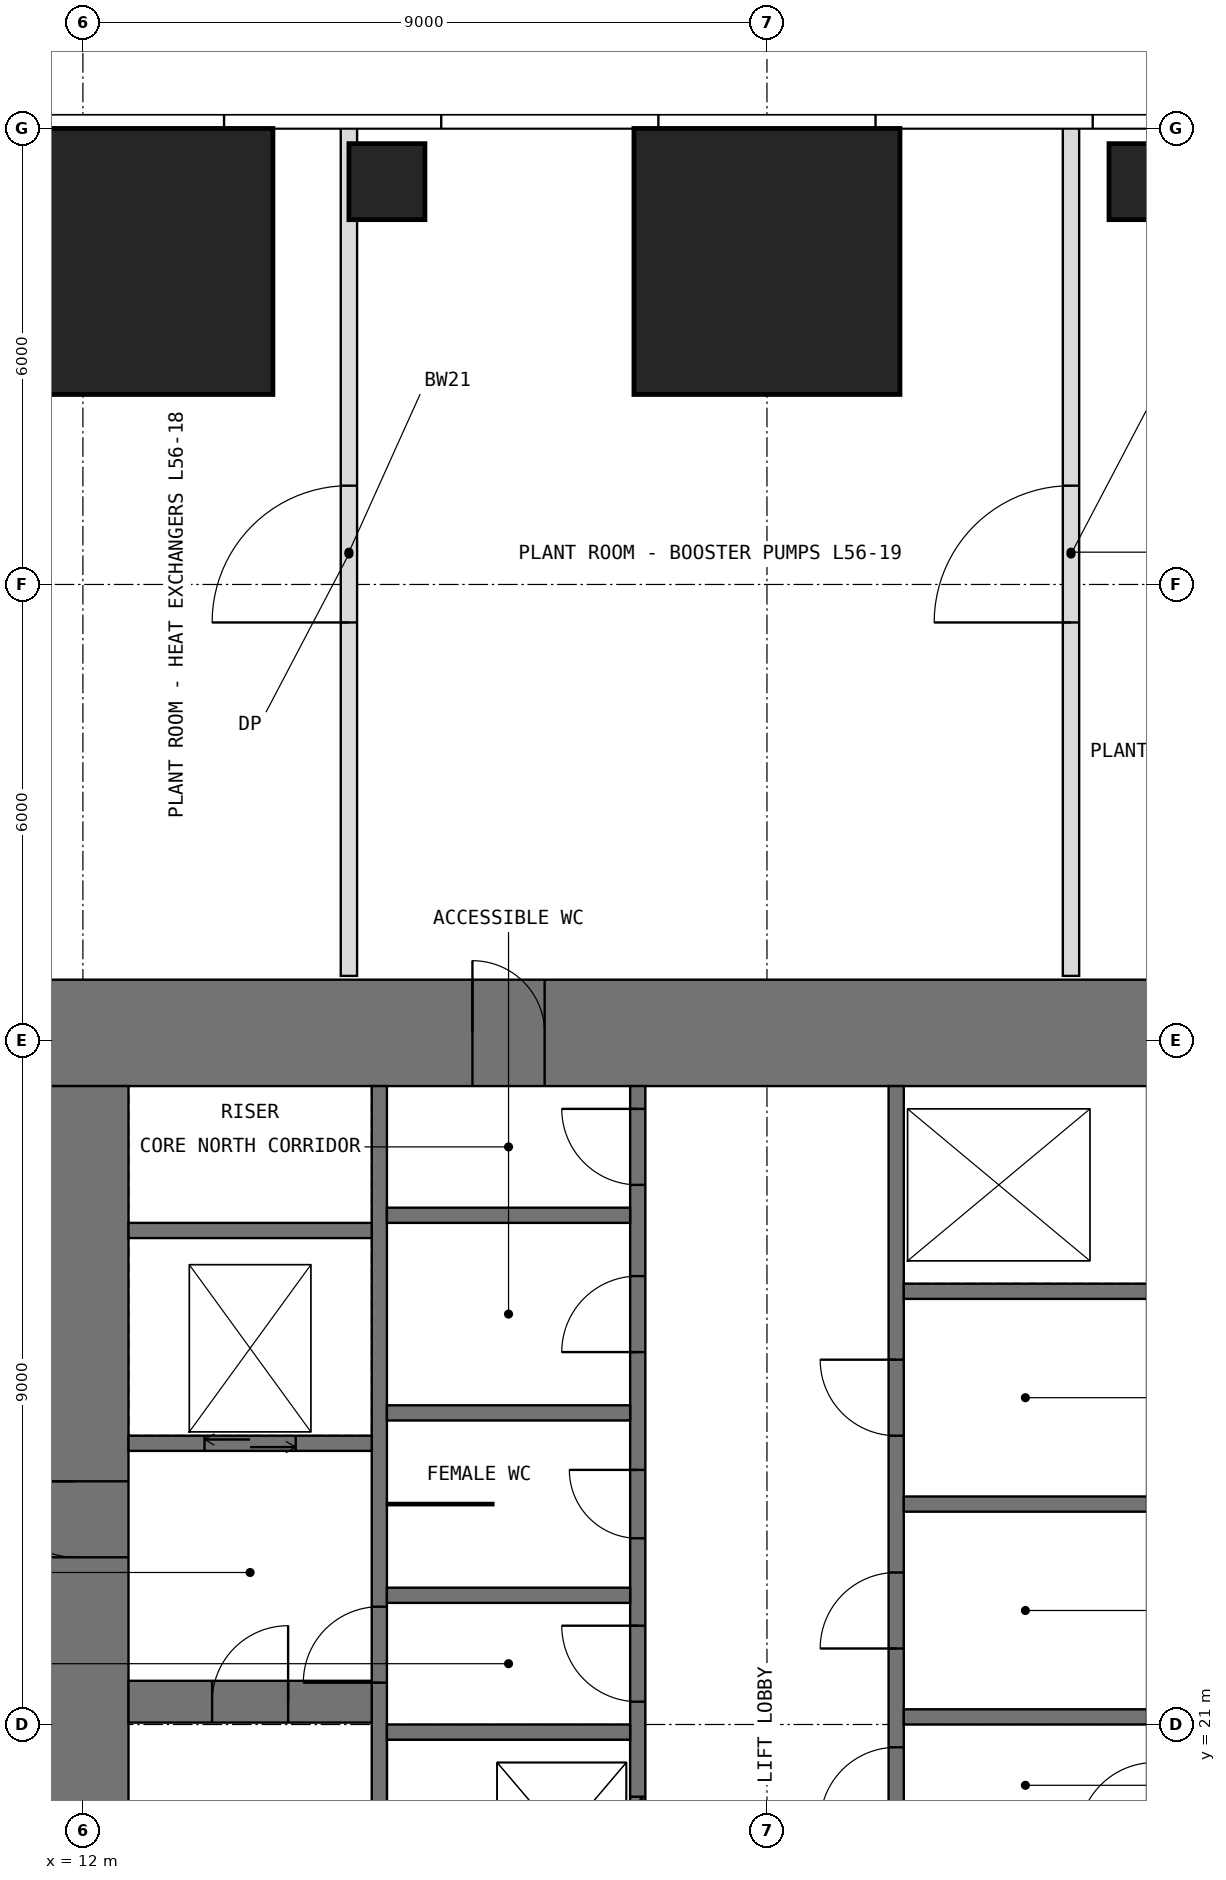
"""IFC4 building model, lengths in metres.
Left out: names, types, materials, properties, quantities, classifications, styles, units other than length and angle.
Written with IfcOpenShell. Run it as: python <this file> out.ifc"""

import sys

from ifc_helpers import new_model, si_unit, direction, frame, frame_2d, origin, origin_2d, place, context, subcontext, project, spatial, rectangle, extrude, element, fill, save


model = new_model("IFC4")
c1 = context("Model", 3, precision=1e-05, world=origin(), true_north=direction((0.0, 1.0)))
c2 = subcontext(c1, "Body", "Model", "MODEL_VIEW")
j1 = project(units=[si_unit("LENGTHUNIT", "METRE"), si_unit("PLANEANGLEUNIT", "RADIAN")], contexts=[c1])
p1 = place(None, origin())
s1 = spatial("IfcSite", under=j1, at=p1, CompositionType="ELEMENT")
p2 = place(p1, origin())
s2 = spatial("IfcBuilding", under=s1, at=p2, CompositionType="ELEMENT")
p3 = place(p2, frame((0.0, 0.0, 234.5)))
s3 = spatial("IfcBuildingStorey", under=s2, at=p3, CompositionType="ELEMENT", Elevation=234.5)
p4 = place(p3, frame((12.75, 40.25, 0.0), z_axis=(0.0, 0.0, 1.0), x_axis=(1.0, 0.0, 0.0)))
e1 = element("IfcColumn", 1, at=p4, inside=s3, PredefinedType="COLUMN", context=c2, shape_type="SweptSolid", body=[
    extrude(rectangle(XDim=3.5, YDim=3.5, at=origin_2d()), origin(), (0.0, 0.0, 1.0), 5.0),
])
p5 = place(p3, frame((16.0, 41.3, 0.0), z_axis=(0.0, 0.0, 1.0), x_axis=(1.0, 0.0, 0.0)))
e2 = element("IfcColumn", 2, at=p5, inside=s3, PredefinedType="COLUMN", context=c2, shape_type="SweptSolid", body=[
    extrude(rectangle(XDim=1.0, YDim=1.0, at=origin_2d()), origin(), (0.0, 0.0, 1.0), 5.0),
])
p6 = place(p3, frame((21.0, 40.25, 0.0), z_axis=(0.0, 0.0, 1.0), x_axis=(1.0, 0.0, 0.0)))
e3 = element("IfcColumn", 3, at=p6, inside=s3, PredefinedType="COLUMN", context=c2, shape_type="SweptSolid", body=[
    extrude(rectangle(XDim=3.5, YDim=3.5, at=origin_2d()), origin(), (0.0, 0.0, 1.0), 5.0),
])
p7 = place(p3, frame((26.0, 41.3, 0.0), z_axis=(0.0, 0.0, 1.0), x_axis=(1.0, 0.0, 0.0)))
e4 = element("IfcColumn", 4, at=p7, inside=s3, PredefinedType="COLUMN", context=c2, shape_type="SweptSolid", body=[
    extrude(rectangle(XDim=1.0, YDim=1.0, at=origin_2d()), origin(), (0.0, 0.0, 1.0), 5.0),
])
p8 = place(p3, frame((11.2, 30.1, -0.25), z_axis=(0.0, 0.0, 1.0), x_axis=(1.0, 0.0, 0.0)))
e5 = element("IfcWall", 5, at=p8, inside=s3, PredefinedType="SHEAR", context=c2, shape_type="SweptSolid", body=[
    extrude(rectangle(XDim=19.6, YDim=1.4, at=frame_2d((9.8, 0.0))), origin(), (0.0, 0.0, 1.0), 5.2),
])
p9 = place(p8, frame((5.925, 0.0, 0.25)))
e6 = element("IfcOpeningElement", 6, at=p9, cuts=e5, PredefinedType="OPENING", context=c2, shape_type="SweptSolid", body=[
    extrude(rectangle(XDim=0.95, YDim=2.4, at=frame_2d((0.475, 1.2))), frame((0.0, 0.71, 0.0), z_axis=(0.0, -1.0, 0.0), x_axis=(1.0, 0.0, 0.0)), (0.0, 0.0, 1.0), 1.42),
])
p10 = place(p3, frame((11.9, 12.6, -0.25), z_axis=(0.0, 0.0, 1.0), x_axis=(0.0, 1.0, 0.0)))
e7 = element("IfcWall", 7, at=p10, inside=s3, PredefinedType="SHEAR", context=c2, shape_type="SweptSolid", body=[
    extrude(rectangle(XDim=16.8, YDim=1.4, at=frame_2d((8.4, 0.0))), origin(), (0.0, 0.0, 1.0), 5.2),
])
p11 = place(p10, frame((10.6, 0.0, 0.25)))
e8 = element("IfcOpeningElement", 8, at=p11, cuts=e7, PredefinedType="OPENING", context=c2, shape_type="SweptSolid", body=[
    extrude(rectangle(XDim=1.0, YDim=2.2, at=frame_2d((0.5, 1.1))), frame((0.0, 0.71, 0.0), z_axis=(0.0, -1.0, 0.0), x_axis=(1.0, 0.0, 0.0)), (0.0, 0.0, 1.0), 1.42),
])
p12 = place(p3, frame((15.9, 12.6, -0.25), z_axis=(0.0, 0.0, 1.0), x_axis=(0.0, 1.0, 0.0)))
e9 = element("IfcWall", 9, at=p12, inside=s3, PredefinedType="SHEAR", context=c2, shape_type="SweptSolid", body=[
    extrude(rectangle(XDim=16.8, YDim=0.2, at=frame_2d((8.4, 0.0))), origin(), (0.0, 0.0, 1.0), 5.2),
])
p13 = place(p12, frame((8.95, 0.0, 0.25)))
e10 = element("IfcOpeningElement", 10, at=p13, cuts=e9, PredefinedType="OPENING", context=c2, shape_type="SweptSolid", body=[
    extrude(rectangle(XDim=1.0, YDim=2.2, at=frame_2d((0.5, 1.1))), frame((0.0, 0.11, 0.0), z_axis=(0.0, -1.0, 0.0), x_axis=(1.0, 0.0, 0.0)), (0.0, 0.0, 1.0), 0.22),
])
p14 = place(p3, frame((19.3, 12.6, -0.25), z_axis=(0.0, 0.0, 1.0), x_axis=(0.0, 1.0, 0.0)))
e11 = element("IfcWall", 11, at=p14, inside=s3, PredefinedType="SHEAR", context=c2, shape_type="SweptSolid", body=[
    extrude(rectangle(XDim=16.8, YDim=0.2, at=frame_2d((8.4, 0.0))), origin(), (0.0, 0.0, 1.0), 5.2),
])
p15 = place(p14, frame((8.7, 0.0, 0.25)))
e12 = element("IfcOpeningElement", 12, at=p15, cuts=e11, PredefinedType="OPENING", context=c2, shape_type="SweptSolid", body=[
    extrude(rectangle(XDim=1.0, YDim=2.2, at=frame_2d((0.5, 1.1))), frame((0.0, 0.11, 0.0), z_axis=(0.0, -1.0, 0.0), x_axis=(1.0, 0.0, 0.0)), (0.0, 0.0, 1.0), 0.22),
])
p16 = place(p14, frame((10.85, 0.0, 0.25)))
e13 = element("IfcOpeningElement", 13, at=p16, cuts=e11, PredefinedType="OPENING", context=c2, shape_type="SweptSolid", body=[
    extrude(rectangle(XDim=0.9, YDim=2.2, at=frame_2d((0.45, 1.1))), frame((0.0, 0.11, 0.0), z_axis=(0.0, -1.0, 0.0), x_axis=(1.0, 0.0, 0.0)), (0.0, 0.0, 1.0), 0.22),
])
p17 = place(p14, frame((13.3, 0.0, 0.25)))
e14 = element("IfcOpeningElement", 14, at=p17, cuts=e11, PredefinedType="OPENING", context=c2, shape_type="SweptSolid", body=[
    extrude(rectangle(XDim=1.0, YDim=2.2, at=frame_2d((0.5, 1.1))), frame((0.0, 0.11, 0.0), z_axis=(0.0, -1.0, 0.0), x_axis=(1.0, 0.0, 0.0)), (0.0, 0.0, 1.0), 0.22),
])
p18 = place(p14, frame((15.5, 0.0, 0.25)))
e15 = element("IfcOpeningElement", 15, at=p18, cuts=e11, PredefinedType="OPENING", context=c2, shape_type="SweptSolid", body=[
    extrude(rectangle(XDim=1.0, YDim=2.2, at=frame_2d((0.5, 1.1))), frame((0.0, 0.11, 0.0), z_axis=(0.0, -1.0, 0.0), x_axis=(1.0, 0.0, 0.0)), (0.0, 0.0, 1.0), 0.22),
])
p19 = place(p14, frame((0.75, 0.0, 0.25)))
e16 = element("IfcOpeningElement", 16, at=p19, cuts=e11, PredefinedType="OPENING", context=c2, shape_type="SweptSolid", body=[
    extrude(rectangle(XDim=1.1, YDim=2.2, at=frame_2d((0.55, 1.1))), frame((0.0, 0.11, 0.0), z_axis=(0.0, -1.0, 0.0), x_axis=(1.0, 0.0, 0.0)), (0.0, 0.0, 1.0), 0.22),
])
p20 = place(p14, frame((3.55, 0.0, 0.25)))
e17 = element("IfcOpeningElement", 17, at=p20, cuts=e11, PredefinedType="OPENING", context=c2, shape_type="SweptSolid", body=[
    extrude(rectangle(XDim=1.1, YDim=2.2, at=frame_2d((0.55, 1.1))), frame((0.0, 0.11, 0.0), z_axis=(0.0, -1.0, 0.0), x_axis=(1.0, 0.0, 0.0)), (0.0, 0.0, 1.0), 0.22),
])
p21 = place(p14, frame((6.35, 0.0, 0.25)))
e18 = element("IfcOpeningElement", 18, at=p21, cuts=e11, PredefinedType="OPENING", context=c2, shape_type="SweptSolid", body=[
    extrude(rectangle(XDim=1.1, YDim=2.2, at=frame_2d((0.55, 1.1))), frame((0.0, 0.11, 0.0), z_axis=(0.0, -1.0, 0.0), x_axis=(1.0, 0.0, 0.0)), (0.0, 0.0, 1.0), 0.22),
])
p22 = place(p3, frame((22.7, 12.6, -0.25), z_axis=(0.0, 0.0, 1.0), x_axis=(0.0, 1.0, 0.0)))
e19 = element("IfcWall", 19, at=p22, inside=s3, PredefinedType="SHEAR", context=c2, shape_type="SweptSolid", body=[
    extrude(rectangle(XDim=16.8, YDim=0.2, at=frame_2d((8.4, 0.0))), origin(), (0.0, 0.0, 1.0), 5.2),
])
p23 = place(p22, frame((0.4, 0.0, 0.25)))
e20 = element("IfcOpeningElement", 20, at=p23, cuts=e19, PredefinedType="OPENING", context=c2, shape_type="SweptSolid", body=[
    extrude(rectangle(XDim=1.0, YDim=2.2, at=frame_2d((0.5, 1.1))), frame((0.0, 0.11, 0.0), z_axis=(0.0, -1.0, 0.0), x_axis=(1.0, 0.0, 0.0)), (0.0, 0.0, 1.0), 0.22),
])
p24 = place(p22, frame((7.1, 0.0, 0.25)))
e21 = element("IfcOpeningElement", 21, at=p24, cuts=e19, PredefinedType="OPENING", context=c2, shape_type="SweptSolid", body=[
    extrude(rectangle(XDim=1.0, YDim=2.2, at=frame_2d((0.5, 1.1))), frame((0.0, 0.11, 0.0), z_axis=(0.0, -1.0, 0.0), x_axis=(1.0, 0.0, 0.0)), (0.0, 0.0, 1.0), 0.22),
])
p25 = place(p22, frame((2.45, 0.0, 0.25)))
e22 = element("IfcOpeningElement", 22, at=p25, cuts=e19, PredefinedType="OPENING", context=c2, shape_type="SweptSolid", body=[
    extrude(rectangle(XDim=0.9, YDim=2.2, at=frame_2d((0.45, 1.1))), frame((0.0, 0.11, 0.0), z_axis=(0.0, -1.0, 0.0), x_axis=(1.0, 0.0, 0.0)), (0.0, 0.0, 1.0), 0.22),
])
p26 = place(p22, frame((4.95, 0.0, 0.25)))
e23 = element("IfcOpeningElement", 23, at=p26, cuts=e19, PredefinedType="OPENING", context=c2, shape_type="SweptSolid", body=[
    extrude(rectangle(XDim=0.9, YDim=2.2, at=frame_2d((0.45, 1.1))), frame((0.0, 0.11, 0.0), z_axis=(0.0, -1.0, 0.0), x_axis=(1.0, 0.0, 0.0)), (0.0, 0.0, 1.0), 0.22),
])
p27 = place(p22, frame((9.4, 0.0, 0.25)))
e24 = element("IfcOpeningElement", 24, at=p27, cuts=e19, PredefinedType="OPENING", context=c2, shape_type="SweptSolid", body=[
    extrude(rectangle(XDim=1.0, YDim=2.2, at=frame_2d((0.5, 1.1))), frame((0.0, 0.11, 0.0), z_axis=(0.0, -1.0, 0.0), x_axis=(1.0, 0.0, 0.0)), (0.0, 0.0, 1.0), 0.22),
])
p28 = place(p22, frame((12.2, 0.0, 0.25)))
e25 = element("IfcOpeningElement", 25, at=p28, cuts=e19, PredefinedType="OPENING", context=c2, shape_type="SweptSolid", body=[
    extrude(rectangle(XDim=1.0, YDim=2.2, at=frame_2d((0.5, 1.1))), frame((0.0, 0.11, 0.0), z_axis=(0.0, -1.0, 0.0), x_axis=(1.0, 0.0, 0.0)), (0.0, 0.0, 1.0), 0.22),
])
p29 = place(p3, frame((12.6, 21.3, -0.25), z_axis=(0.0, 0.0, 1.0), x_axis=(1.0, 0.0, 0.0)))
e26 = element("IfcWall", 26, at=p29, inside=s3, PredefinedType="SHEAR", context=c2, shape_type="SweptSolid", body=[
    extrude(rectangle(XDim=3.2, YDim=0.55, at=frame_2d((1.6, 0.0))), origin(), (0.0, 0.0, 1.0), 5.2),
])
p30 = place(p29, frame((1.1, 0.0, 0.25)))
e27 = element("IfcOpeningElement", 27, at=p30, cuts=e26, PredefinedType="OPENING", context=c2, shape_type="SweptSolid", body=[
    extrude(rectangle(XDim=1.0, YDim=2.2, at=frame_2d((0.5, 1.1))), frame((0.0, 0.285, 0.0), z_axis=(0.0, -1.0, 0.0), x_axis=(1.0, 0.0, 0.0)), (0.0, 0.0, 1.0), 0.57),
])
p31 = place(p3, frame((12.6, 24.7, -0.25), z_axis=(0.0, 0.0, 1.0), x_axis=(1.0, 0.0, 0.0)))
e28 = element("IfcWall", 28, at=p31, inside=s3, PredefinedType="SHEAR", context=c2, shape_type="SweptSolid", body=[
    extrude(rectangle(XDim=3.2, YDim=0.2, at=frame_2d((1.6, 0.0))), origin(), (0.0, 0.0, 1.0), 5.2),
])
p32 = place(p31, frame((1.0, 0.0, 0.25)))
e29 = element("IfcOpeningElement", 29, at=p32, cuts=e28, PredefinedType="OPENING", context=c2, shape_type="SweptSolid", body=[
    extrude(rectangle(XDim=1.2, YDim=2.2, at=frame_2d((0.6, 1.1))), frame((0.0, 0.11, 0.0), z_axis=(0.0, -1.0, 0.0), x_axis=(1.0, 0.0, 0.0)), (0.0, 0.0, 1.0), 0.22),
])
for number, where, z_axis, x_axis in (
    (30, (12.6, 27.5, -0.25), (0.0, 0.0, 1.0), (1.0, 0.0, 0.0)),
    (31, (16.0, 20.9, -0.25), (0.0, 0.0, 1.0), (1.0, 0.0, 0.0)),
    (32, (16.0, 22.7, -0.25), (0.0, 0.0, 1.0), (1.0, 0.0, 0.0)),
    (33, (16.0, 25.1, -0.25), (0.0, 0.0, 1.0), (1.0, 0.0, 0.0)),
    (34, (16.0, 27.7, -0.25), (0.0, 0.0, 1.0), (1.0, 0.0, 0.0)),
    (35, (22.8, 21.1, -0.25), (0.0, 0.0, 1.0), (1.0, 0.0, 0.0)),
    (36, (22.8, 23.9, -0.25), (0.0, 0.0, 1.0), (1.0, 0.0, 0.0)),
    (37, (22.8, 26.7, -0.25), (0.0, 0.0, 1.0), (1.0, 0.0, 0.0)),
):
    element("IfcWall", number, at=place(p3, frame(where, z_axis=z_axis, x_axis=x_axis)), inside=s3, PredefinedType="SHEAR", context=c2, shape_type="SweptSolid", body=[
        extrude(rectangle(XDim=3.2, YDim=0.2, at=frame_2d((1.6, 0.0))), origin(), (0.0, 0.0, 1.0), 5.2),
    ])
p33 = place(p3, frame((16.0, 23.9, 0.0), z_axis=(0.0, 0.0, 1.0), x_axis=(1.0, 0.0, 0.0)))
e38 = element("IfcWall", 38, at=p33, inside=s3, PredefinedType="PARTITIONING", context=c2, shape_type="SweptSolid", body=[
    extrude(rectangle(XDim=1.4, YDim=0.03, at=frame_2d((0.7, 0.0))), origin(), (0.0, 0.0, 1.0), 4.75),
])
p34 = place(p3, frame((15.5, 30.85, 0.0), z_axis=(0.0, 0.0, 1.0), x_axis=(0.0, 1.0, 0.0)))
e39 = element("IfcWall", 39, at=p34, inside=s3, PredefinedType="PARTITIONING", context=c2, shape_type="SweptSolid", body=[
    extrude(rectangle(XDim=11.15, YDim=0.215, at=frame_2d((5.575, 0.0))), origin(), (0.0, 0.0, 1.0), 4.75),
])
p35 = place(p34, frame((4.65, 0.0, 0.0)))
e40 = element("IfcOpeningElement", 40, at=p35, cuts=e39, PredefinedType="OPENING", context=c2, shape_type="SweptSolid", body=[
    extrude(rectangle(XDim=1.8, YDim=2.4, at=frame_2d((0.9, 1.2))), frame((0.0, 0.118, 0.0), z_axis=(0.0, -1.0, 0.0), x_axis=(1.0, 0.0, 0.0)), (0.0, 0.0, 1.0), 0.235),
])
p36 = place(p3, frame((25.0, 30.85, 0.0), z_axis=(0.0, 0.0, 1.0), x_axis=(0.0, 1.0, 0.0)))
e41 = element("IfcWall", 41, at=p36, inside=s3, PredefinedType="PARTITIONING", context=c2, shape_type="SweptSolid", body=[
    extrude(rectangle(XDim=11.15, YDim=0.215, at=frame_2d((5.575, 0.0))), origin(), (0.0, 0.0, 1.0), 4.75),
])
p37 = place(p36, frame((4.65, 0.0, 0.0)))
e42 = element("IfcOpeningElement", 42, at=p37, cuts=e41, PredefinedType="OPENING", context=c2, shape_type="SweptSolid", body=[
    extrude(rectangle(XDim=1.8, YDim=2.4, at=frame_2d((0.9, 1.2))), frame((0.0, 0.118, 0.0), z_axis=(0.0, -1.0, 0.0), x_axis=(1.0, 0.0, 0.0)), (0.0, 0.0, 1.0), 0.235),
])
p38 = place(p9, origin())
e43 = element("IfcDoor", 43, at=p38, inside=s3, OperationType="SINGLE_SWING_LEFT", PredefinedType="DOOR", context=c2, shape_type="SweptSolid", body=[
    extrude(rectangle(XDim=0.95, YDim=2.4, at=frame_2d((0.475, 1.2))), frame((0.0, 0.225, 0.0), z_axis=(0.0, -1.0, 0.0), x_axis=(1.0, 0.0, 0.0)), (0.0, 0.0, 1.0), 0.05),
])
fill(e6, e43)
p39 = place(p11, origin())
e44 = element("IfcDoor", 44, at=p39, inside=s3, OperationType="SINGLE_SWING_RIGHT", PredefinedType="DOOR", context=c2, shape_type="SweptSolid", body=[
    extrude(rectangle(XDim=1.0, YDim=2.2, at=frame_2d((0.5, 1.1))), frame((0.0, 0.025, 0.0), z_axis=(0.0, -1.0, 0.0), x_axis=(1.0, 0.0, 0.0)), (0.0, 0.0, 1.0), 0.05),
])
fill(e8, e44)
p40 = place(p30, origin())
e45 = element("IfcDoor", 45, at=p40, inside=s3, OperationType="SINGLE_SWING_RIGHT", PredefinedType="DOOR", context=c2, shape_type="SweptSolid", body=[
    extrude(rectangle(XDim=1.0, YDim=2.2, at=frame_2d((0.5, 1.1))), frame((0.0, 0.025, 0.0), z_axis=(0.0, -1.0, 0.0), x_axis=(1.0, 0.0, 0.0)), (0.0, 0.0, 1.0), 0.05),
])
fill(e27, e45)
p41 = place(p13, origin())
e46 = element("IfcDoor", 46, at=p41, inside=s3, OperationType="SINGLE_SWING_LEFT", PredefinedType="DOOR", context=c2, shape_type="SweptSolid", body=[
    extrude(rectangle(XDim=1.0, YDim=2.2, at=frame_2d((0.5, 1.1))), frame((0.0, 0.025, 0.0), z_axis=(0.0, -1.0, 0.0), x_axis=(1.0, 0.0, 0.0)), (0.0, 0.0, 1.0), 0.05),
])
fill(e10, e46)
p42 = place(p15, origin())
e47 = element("IfcDoor", 47, at=p42, inside=s3, OperationType="SINGLE_SWING_RIGHT", PredefinedType="DOOR", context=c2, shape_type="SweptSolid", body=[
    extrude(rectangle(XDim=1.0, YDim=2.2, at=frame_2d((0.5, 1.1))), frame((0.0, 0.025, 0.0), z_axis=(0.0, -1.0, 0.0), x_axis=(1.0, 0.0, 0.0)), (0.0, 0.0, 1.0), 0.05),
])
fill(e12, e47)
p43 = place(p24, origin())
e48 = element("IfcDoor", 48, at=p43, inside=s3, OperationType="SINGLE_SWING_LEFT", PredefinedType="DOOR", context=c2, shape_type="SweptSolid", body=[
    extrude(rectangle(XDim=1.0, YDim=2.2, at=frame_2d((0.5, 1.1))), frame((0.0, 0.025, 0.0), z_axis=(0.0, -1.0, 0.0), x_axis=(1.0, 0.0, 0.0)), (0.0, 0.0, 1.0), 0.05),
])
fill(e21, e48)
p44 = place(p16, origin())
e49 = element("IfcDoor", 49, at=p44, inside=s3, OperationType="SINGLE_SWING_RIGHT", PredefinedType="DOOR", context=c2, shape_type="SweptSolid", body=[
    extrude(rectangle(XDim=0.9, YDim=2.2, at=frame_2d((0.45, 1.1))), frame((0.0, 0.025, 0.0), z_axis=(0.0, -1.0, 0.0), x_axis=(1.0, 0.0, 0.0)), (0.0, 0.0, 1.0), 0.05),
])
fill(e13, e49)
p45 = place(p17, origin())
e50 = element("IfcDoor", 50, at=p45, inside=s3, OperationType="SINGLE_SWING_LEFT", PredefinedType="DOOR", context=c2, shape_type="SweptSolid", body=[
    extrude(rectangle(XDim=1.0, YDim=2.2, at=frame_2d((0.5, 1.1))), frame((0.0, 0.025, 0.0), z_axis=(0.0, -1.0, 0.0), x_axis=(1.0, 0.0, 0.0)), (0.0, 0.0, 1.0), 0.05),
])
fill(e14, e50)
p46 = place(p18, origin())
e51 = element("IfcDoor", 51, at=p46, inside=s3, OperationType="SINGLE_SWING_RIGHT", PredefinedType="DOOR", context=c2, shape_type="SweptSolid", body=[
    extrude(rectangle(XDim=1.0, YDim=2.2, at=frame_2d((0.5, 1.1))), frame((0.0, 0.025, 0.0), z_axis=(0.0, -1.0, 0.0), x_axis=(1.0, 0.0, 0.0)), (0.0, 0.0, 1.0), 0.05),
])
fill(e15, e51)
p47 = place(p27, origin())
e52 = element("IfcDoor", 52, at=p47, inside=s3, OperationType="SINGLE_SWING_LEFT", PredefinedType="DOOR", context=c2, shape_type="SweptSolid", body=[
    extrude(rectangle(XDim=1.0, YDim=2.2, at=frame_2d((0.5, 1.1))), frame((0.0, 0.025, 0.0), z_axis=(0.0, -1.0, 0.0), x_axis=(1.0, 0.0, 0.0)), (0.0, 0.0, 1.0), 0.05),
])
fill(e24, e52)
p48 = place(p28, origin())
e53 = element("IfcDoor", 53, at=p48, inside=s3, OperationType="SINGLE_SWING_RIGHT", PredefinedType="DOOR", context=c2, shape_type="SweptSolid", body=[
    extrude(rectangle(XDim=1.0, YDim=2.2, at=frame_2d((0.5, 1.1))), frame((0.0, 0.025, 0.0), z_axis=(0.0, -1.0, 0.0), x_axis=(1.0, 0.0, 0.0)), (0.0, 0.0, 1.0), 0.05),
])
fill(e25, e53)
p49 = place(p35, origin())
e54 = element("IfcDoor", 54, at=p49, inside=s3, OperationType="DOUBLE_DOOR_SINGLE_SWING", PredefinedType="DOOR", context=c2, shape_type="SweptSolid", body=[
    extrude(rectangle(XDim=1.8, YDim=2.4, at=frame_2d((0.9, 1.2))), frame((0.0, 0.025, 0.0), z_axis=(0.0, -1.0, 0.0), x_axis=(1.0, 0.0, 0.0)), (0.0, 0.0, 1.0), 0.05),
])
fill(e40, e54)
p50 = place(p37, origin())
e55 = element("IfcDoor", 55, at=p50, inside=s3, OperationType="DOUBLE_DOOR_SINGLE_SWING", PredefinedType="DOOR", context=c2, shape_type="SweptSolid", body=[
    extrude(rectangle(XDim=1.8, YDim=2.4, at=frame_2d((0.9, 1.2))), frame((0.0, 0.025, 0.0), z_axis=(0.0, -1.0, 0.0), x_axis=(1.0, 0.0, 0.0)), (0.0, 0.0, 1.0), 0.05),
])
fill(e42, e55)
p51 = place(p21, origin())
e56 = element("IfcDoor", 56, at=p51, inside=s3, OperationType="DOUBLE_DOOR_SLIDING", PredefinedType="DOOR", context=c2, shape_type="SweptSolid", body=[
    extrude(rectangle(XDim=1.1, YDim=2.2, at=frame_2d((0.55, 1.1))), frame((0.0, 0.025, 0.0), z_axis=(0.0, -1.0, 0.0), x_axis=(1.0, 0.0, 0.0)), (0.0, 0.0, 1.0), 0.05),
])
fill(e18, e56)
p52 = place(p32, origin())
e57 = element("IfcDoor", 57, at=p52, inside=s3, OperationType="DOUBLE_DOOR_SLIDING", PredefinedType="DOOR", context=c2, shape_type="SweptSolid", body=[
    extrude(rectangle(XDim=1.2, YDim=2.2, at=frame_2d((0.6, 1.1))), frame((0.0, 0.025, 0.0), z_axis=(0.0, -1.0, 0.0), x_axis=(1.0, 0.0, 0.0)), (0.0, 0.0, 1.0), 0.05),
])
fill(e29, e57)
save(model, sys.argv[1])
